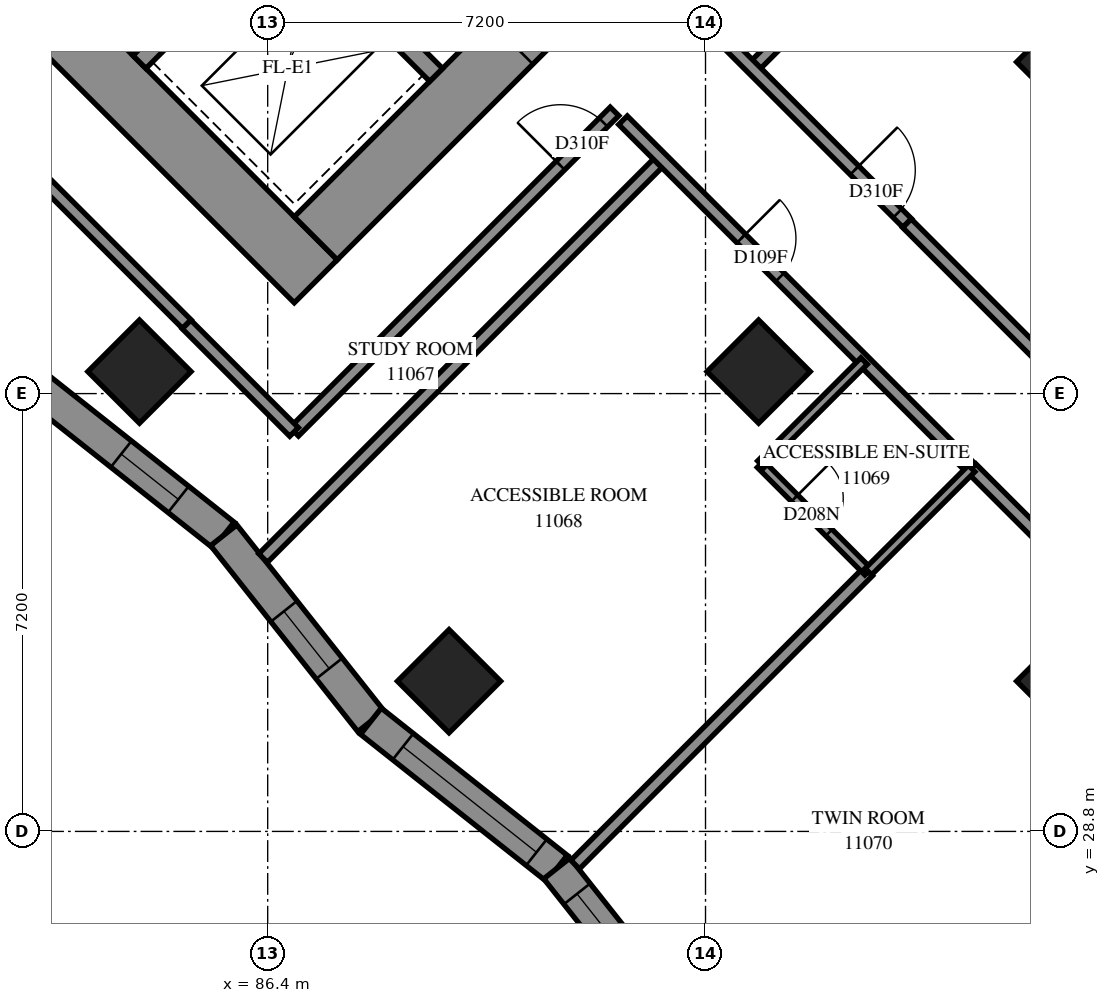
"""IFC4 building model, lengths in metres.
Left out: names, types, materials, properties, quantities, classifications, styles, units other than length and angle.
Written with IfcOpenShell. Run it as: python <this file> out.ifc"""

import sys

from ifc_helpers import new_model, si_unit, direction, frame, frame_2d, origin, origin_2d, place, context, subcontext, project, spatial, polyline, rectangle, outline, extrude, element, fill, save


model = new_model("IFC4")
c1 = context("Model", 3, precision=1e-05, world=origin(), true_north=direction((0.0, 1.0)))
c2 = subcontext(c1, "Body", "Model", "MODEL_VIEW")
j1 = project(units=[si_unit("LENGTHUNIT", "METRE"), si_unit("PLANEANGLEUNIT", "RADIAN")], contexts=[c1])
p1 = place(None, origin())
s1 = spatial("IfcSite", under=j1, at=p1, CompositionType="ELEMENT")
p2 = place(p1, origin())
s2 = spatial("IfcBuilding", under=s1, at=p2, CompositionType="ELEMENT")
p3 = place(p2, frame((0.0, 0.0, 44.0)))
s3 = spatial("IfcBuildingStorey", under=s2, at=p3, CompositionType="ELEMENT", Elevation=44.0)
for number, where, z_axis, x_axis in (
    (1, (84.291, 36.362, 0.0), (0.0, 0.0, 1.0), (0.707, -0.707, 0.0)),
    (2, (99.565, 41.453, 0.0), (0.0, 0.0, 1.0), (0.707, -0.707, 0.0)),
    (3, (94.474, 36.362, 0.0), (0.0, 0.0, 1.0), (0.707, -0.707, 0.0)),
    (4, (89.382, 31.271, 0.0), (0.0, 0.0, 1.0), (0.707, -0.707, 0.0)),
    (5, (99.565, 31.271, 0.0), (0.0, 0.0, 1.0), (0.707, -0.707, 0.0)),
):
    element("IfcColumn", number, at=place(p3, frame(where, z_axis=z_axis, x_axis=x_axis)), inside=s3, PredefinedType="COLUMN", context=c2, shape_type="SweptSolid", body=[
        extrude(rectangle(XDim=1.2, YDim=1.2, at=origin_2d()), origin(), (0.0, 0.0, 1.0), 3.1),
    ])
p4 = place(p3, frame((75.594, 49.443, -0.3), z_axis=(0.0, 0.0, 1.0), x_axis=(0.7071037324, -0.70710983, 0.0)))
e6 = element("IfcWall", 6, at=p4, inside=s3, PredefinedType="SHEAR", context=c2, shape_type="SweptSolid", body=[
    extrude(rectangle(XDim=16.4, YDim=1.0, at=frame_2d((8.2, 0.0))), origin(), (0.0, 0.0, 1.0), 2.7),
])
p5 = place(p3, frame((87.19, 38.554, -0.3), z_axis=(0.0, 0.0, 1.0), x_axis=(0.707103309, 0.7071102534, 0.0)))
e7 = element("IfcWall", 7, at=p5, inside=s3, PredefinedType="SHEAR", context=c2, shape_type="SweptSolid", body=[
    extrude(rectangle(XDim=14.4, YDim=1.0, at=frame_2d((7.2, 0.0))), origin(), (0.0, 0.0, 1.0), 2.7),
])
p6 = place(p5, frame((4.55, 0.0, 0.3)))
e8 = element("IfcOpeningElement", 8, at=p6, cuts=e7, PredefinedType="OPENING", context=c2, shape_type="SweptSolid", body=[
    extrude(rectangle(XDim=1.1, YDim=2.1, at=frame_2d((0.55, 1.05))), frame((0.0, 0.51, 0.0), z_axis=(0.0, -1.0, 0.0), x_axis=(1.0, 0.0, 0.0)), (0.0, 0.0, 1.0), 1.02),
])
p7 = place(p5, frame((11.35, 0.0, 0.3)))
e9 = element("IfcOpeningElement", 9, at=p7, cuts=e7, PredefinedType="OPENING", context=c2, shape_type="SweptSolid", body=[
    extrude(rectangle(XDim=1.1, YDim=2.1, at=frame_2d((0.55, 1.05))), frame((0.0, 0.51, 0.0), z_axis=(0.0, -1.0, 0.0), x_axis=(1.0, 0.0, 0.0)), (0.0, 0.0, 1.0), 1.02),
])
p8 = place(p3, frame((84.291, 41.453, 0.0), z_axis=(0.0, 0.0, 1.0), x_axis=(0.7071067812, 0.7071067812, 0.0)))
e10 = element("IfcWall", 10, at=p8, inside=s3, PredefinedType="SOLIDWALL", context=c2, shape_type="SweptSolid", body=[
    extrude(rectangle(XDim=3.3, YDim=0.3, at=frame_2d((1.65, 0.0))), origin(), (0.0, 0.0, 1.0), 3.1),
])
p9 = place(p3, frame((78.988, 51.423, 0.0), z_axis=(0.0, 0.0, 1.0), x_axis=(0.7071067812, -0.7071067812, 0.0)))
e11 = element("IfcWall", 11, at=p9, inside=s3, PredefinedType="SOLIDWALL", context=c2, shape_type="SweptSolid", body=[
    extrude(rectangle(XDim=14.4, YDim=0.3, at=frame_2d((7.2, 0.0))), origin(), (0.0, 0.0, 1.0), 3.1),
])
p10 = place(p9, frame((1.25, 0.0, 0.0)))
e12 = element("IfcOpeningElement", 12, at=p10, cuts=e11, PredefinedType="OPENING", context=c2, shape_type="SweptSolid", body=[
    extrude(rectangle(XDim=1.1, YDim=2.1, at=frame_2d((0.55, 1.05))), frame((0.0, 0.16, 0.0), z_axis=(0.0, -1.0, 0.0), x_axis=(1.0, 0.0, 0.0)), (0.0, 0.0, 1.0), 0.32),
])
p11 = place(p9, frame((4.85, 0.0, 0.0)))
e13 = element("IfcOpeningElement", 13, at=p11, cuts=e11, PredefinedType="OPENING", context=c2, shape_type="SweptSolid", body=[
    extrude(rectangle(XDim=1.1, YDim=2.1, at=frame_2d((0.55, 1.05))), frame((0.0, 0.16, 0.0), z_axis=(0.0, -1.0, 0.0), x_axis=(1.0, 0.0, 0.0)), (0.0, 0.0, 1.0), 0.32),
])
p12 = place(p9, frame((8.45, 0.0, 0.0)))
e14 = element("IfcOpeningElement", 14, at=p12, cuts=e11, PredefinedType="OPENING", context=c2, shape_type="SweptSolid", body=[
    extrude(rectangle(XDim=1.1, YDim=2.1, at=frame_2d((0.55, 1.05))), frame((0.0, 0.16, 0.0), z_axis=(0.0, -1.0, 0.0), x_axis=(1.0, 0.0, 0.0)), (0.0, 0.0, 1.0), 0.32),
])
p13 = place(p9, frame((12.05, 0.0, 0.0)))
e15 = element("IfcOpeningElement", 15, at=p13, cuts=e11, PredefinedType="OPENING", context=c2, shape_type="SweptSolid", body=[
    extrude(rectangle(XDim=1.1, YDim=2.1, at=frame_2d((0.55, 1.05))), frame((0.0, 0.16, 0.0), z_axis=(0.0, -1.0, 0.0), x_axis=(1.0, 0.0, 0.0)), (0.0, 0.0, 1.0), 0.32),
])
p14 = place(p3, frame((82.619, 36.091, 0.0), z_axis=(0.0, 0.0, 1.0), x_axis=(0.7841326465, -0.6205932587, 0.0)))
e16 = element("IfcWall", 16, at=p14, inside=s3, PredefinedType="SOLIDWALL", context=c2, shape_type="SweptSolid", body=[
    extrude(outline(polyline([(-0.032, -0.275), (3.868, -0.275), (3.932, 0.275), (0.032, 0.275), (-0.032, -0.275)])), origin(), (0.0, 0.0, 1.0), 3.1),
])
p15 = place(p14, frame((1.749, 0.0, 0.5)))
e17 = element("IfcOpeningElement", 17, at=p15, cuts=e16, PredefinedType="OPENING", context=c2, shape_type="SweptSolid", body=[
    extrude(rectangle(XDim=1.2, YDim=2.45, at=frame_2d((0.6, 1.225))), frame((0.0, 0.285, 0.0), z_axis=(0.0, -1.0, 0.0), x_axis=(1.0, 0.0, 0.0)), (0.0, 0.0, 1.0), 0.57),
])
p16 = place(p3, frame((85.677, 33.67, 0.0), z_axis=(0.0, 0.0, 1.0), x_axis=(0.6205932587, -0.7841326465, 0.0)))
e18 = element("IfcWall", 18, at=p16, inside=s3, PredefinedType="SOLIDWALL", context=c2, shape_type="SweptSolid", body=[
    extrude(outline(polyline([(0.032, -0.275), (3.932, -0.275), (3.868, 0.275), (-0.032, 0.275), (0.032, -0.275)])), origin(), (0.0, 0.0, 1.0), 3.1),
])
p17 = place(p16, frame((1.595, 0.0, 0.5)))
e19 = element("IfcOpeningElement", 19, at=p17, cuts=e18, PredefinedType="OPENING", context=c2, shape_type="SweptSolid", body=[
    extrude(rectangle(XDim=1.2, YDim=2.45, at=frame_2d((0.6, 1.225))), frame((0.0, 0.285, 0.0), z_axis=(0.0, -1.0, 0.0), x_axis=(1.0, 0.0, 0.0)), (0.0, 0.0, 1.0), 0.57),
])
p18 = place(p3, frame((88.097, 30.612, 0.0), z_axis=(0.0, 0.0, 1.0), x_axis=(0.7841326465, -0.6205932587, 0.0)))
e20 = element("IfcWall", 20, at=p18, inside=s3, PredefinedType="SOLIDWALL", context=c2, shape_type="SweptSolid", body=[
    extrude(outline(polyline([(-0.032, -0.275), (3.868, -0.275), (3.932, 0.275), (0.032, 0.275), (-0.032, -0.275)])), origin(), (0.0, 0.0, 1.0), 3.1),
])
p19 = place(p18, frame((0.673, 0.0, 0.5)))
e21 = element("IfcOpeningElement", 21, at=p19, cuts=e20, PredefinedType="OPENING", context=c2, shape_type="SweptSolid", body=[
    extrude(rectangle(XDim=2.8, YDim=2.45, at=frame_2d((1.4, 1.225))), frame((0.0, 0.285, 0.0), z_axis=(0.0, -1.0, 0.0), x_axis=(1.0, 0.0, 0.0)), (0.0, 0.0, 1.0), 0.57),
])
p20 = place(p3, frame((91.156, 28.192, 0.0), z_axis=(0.0, 0.0, 1.0), x_axis=(0.6205932587, -0.7841326465, 0.0)))
e22 = element("IfcWall", 22, at=p20, inside=s3, PredefinedType="SOLIDWALL", context=c2, shape_type="SweptSolid", body=[
    extrude(outline(polyline([(0.032, -0.275), (3.932, -0.275), (3.868, 0.275), (-0.032, 0.275), (0.032, -0.275)])), origin(), (0.0, 0.0, 1.0), 3.1),
])
p21 = place(p20, frame((0.534, 0.0, 0.5)))
e23 = element("IfcOpeningElement", 23, at=p21, cuts=e22, PredefinedType="OPENING", context=c2, shape_type="SweptSolid", body=[
    extrude(rectangle(XDim=2.8, YDim=2.45, at=frame_2d((1.4, 1.225))), frame((0.0, 0.285, 0.0), z_axis=(0.0, -1.0, 0.0), x_axis=(1.0, 0.0, 0.0)), (0.0, 0.0, 1.0), 0.57),
])
p22 = place(p3, frame((94.367, 41.349, 0.0), z_axis=(0.0, 0.0, 1.0), x_axis=(0.7071109781, 0.7071025843, 0.0)))
e24 = element("IfcWall", 24, at=p22, inside=s3, PredefinedType="PARTITIONING", context=c2, shape_type="SweptSolid", body=[
    extrude(rectangle(XDim=11.914, YDim=0.2, at=frame_2d((5.957, 0.0))), origin(), (0.0, 0.0, 1.0), 3.1),
])
p23 = place(p3, frame((86.324, 33.296, 0.0), z_axis=(0.0, 0.0, 1.0), x_axis=(0.7069990152, 0.7072145308, 0.0)))
e25 = element("IfcWall", 25, at=p23, inside=s3, PredefinedType="PARTITIONING", context=c2, shape_type="SweptSolid", body=[
    extrude(rectangle(XDim=9.28, YDim=0.2, at=frame_2d((4.64, 0.0))), origin(), (0.0, 0.0, 1.0), 3.1),
])
p24 = place(p3, frame((92.243, 40.495, 0.0), z_axis=(0.0, 0.0, 1.0), x_axis=(0.7071067812, -0.7071067812, 0.0)))
e26 = element("IfcWall", 26, at=p24, inside=s3, PredefinedType="PARTITIONING", context=c2, shape_type="SweptSolid", body=[
    extrude(rectangle(XDim=8.101, YDim=0.2, at=frame_2d((4.05, 0.0))), origin(), (0.0, 0.0, 1.0), 3.1),
])
p25 = place(p24, frame((2.75, 0.0, 0.0)))
e27 = element("IfcOpeningElement", 27, at=p25, cuts=e26, PredefinedType="OPENING", context=c2, shape_type="SweptSolid", body=[
    extrude(rectangle(XDim=0.9, YDim=2.1, at=frame_2d((0.45, 1.05))), frame((0.0, 0.11, 0.0), z_axis=(0.0, -1.0, 0.0), x_axis=(1.0, 0.0, 0.0)), (0.0, 0.0, 1.0), 0.22),
])
p26 = place(p3, frame((86.836, 35.372, 0.0), z_axis=(0.0, 0.0, 1.0), x_axis=(0.7071067812, 0.7071067812, 0.0)))
e28 = element("IfcWall", 28, at=p26, inside=s3, PredefinedType="PARTITIONING", context=c2, shape_type="SweptSolid", body=[
    extrude(rectangle(XDim=7.45, YDim=0.2, at=frame_2d((3.725, 0.0))), origin(), (0.0, 0.0, 1.0), 3.1),
])
p27 = place(p26, frame((6.192, 0.0, 0.0)))
e29 = element("IfcOpeningElement", 29, at=p27, cuts=e28, PredefinedType="OPENING", context=c2, shape_type="SweptSolid", body=[
    extrude(rectangle(XDim=1.0, YDim=2.1, at=frame_2d((0.5, 1.05))), frame((0.0, 0.11, 0.0), z_axis=(0.0, -1.0, 0.0), x_axis=(1.0, 0.0, 0.0)), (0.0, 0.0, 1.0), 0.22),
])
p28 = place(p3, frame((96.53, 23.146, 0.0), z_axis=(0.0, 0.0, 1.0), x_axis=(0.7071140909, 0.7070994714, 0.0)))
e30 = element("IfcWall", 30, at=p28, inside=s3, PredefinedType="PARTITIONING", context=c2, shape_type="SweptSolid", body=[
    extrude(rectangle(XDim=6.84, YDim=0.2, at=frame_2d((3.42, 0.0))), origin(), (0.0, 0.0, 1.0), 3.1),
])
p29 = place(p3, frame((91.456, 28.255, 0.0), z_axis=(0.0, 0.0, 1.0), x_axis=(0.7071067812, 0.7071067812, 0.0)))
e31 = element("IfcWall", 31, at=p29, inside=s3, PredefinedType="PARTITIONING", context=c2, shape_type="SweptSolid", body=[
    extrude(rectangle(XDim=6.816, YDim=0.2, at=frame_2d((3.408, 0.0))), origin(), (0.0, 0.0, 1.0), 3.1),
])
p30 = place(p3, frame((85.07, 37.142, 0.0), z_axis=(0.0, 0.0, 1.0), x_axis=(-0.7070899851, 0.7071235769, 0.0)))
e32 = element("IfcWall", 32, at=p30, inside=s3, PredefinedType="PARTITIONING", context=c2, shape_type="SweptSolid", body=[
    extrude(rectangle(XDim=5.954, YDim=0.2, at=frame_2d((2.977, 0.0))), origin(), (0.0, 0.0, 1.0), 3.1),
])
p31 = place(p3, frame((93.735, 41.987, 0.0), z_axis=(0.0, 0.0, 1.0), x_axis=(0.7071067812, -0.7071067812, 0.0)))
e33 = element("IfcWall", 33, at=p31, inside=s3, PredefinedType="PARTITIONING", context=c2, shape_type="SweptSolid", body=[
    extrude(rectangle(XDim=4.5, YDim=0.2, at=frame_2d((2.25, 0.0))), origin(), (0.0, 0.0, 1.0), 3.1),
])
p32 = place(p31, frame((3.274, 0.0, 0.0)))
e34 = element("IfcOpeningElement", 34, at=p32, cuts=e33, PredefinedType="OPENING", context=c2, shape_type="SweptSolid", body=[
    extrude(rectangle(XDim=1.0, YDim=2.1, at=frame_2d((0.5, 1.05))), frame((0.0, 0.11, 0.0), z_axis=(0.0, -1.0, 0.0), x_axis=(1.0, 0.0, 0.0)), (0.0, 0.0, 1.0), 0.22),
])
p33 = place(p3, frame((96.913, 38.801, 0.0), z_axis=(0.0, 0.0, 1.0), x_axis=(0.7068288851, -0.7073845681, 0.0)))
e35 = element("IfcWall", 35, at=p33, inside=s3, PredefinedType="PARTITIONING", context=c2, shape_type="SweptSolid", body=[
    extrude(rectangle(XDim=3.599, YDim=0.2, at=frame_2d((1.8, 0.0))), origin(), (0.0, 0.0, 1.0), 3.1),
])
p34 = place(p3, frame((97.976, 34.772, 0.0), z_axis=(0.0, 0.0, 1.0), x_axis=(0.7073845681, -0.7068288851, 0.0)))
e36 = element("IfcWall", 36, at=p34, inside=s3, PredefinedType="PARTITIONING", context=c2, shape_type="SweptSolid", body=[
    extrude(rectangle(XDim=3.599, YDim=0.2, at=frame_2d((1.8, 0.0))), origin(), (0.0, 0.0, 1.0), 3.1),
])
p35 = place(p34, frame((1.858, 0.0, 0.0)))
e37 = element("IfcOpeningElement", 37, at=p35, cuts=e36, PredefinedType="OPENING", context=c2, shape_type="SweptSolid", body=[
    extrude(rectangle(XDim=0.9, YDim=2.1, at=frame_2d((0.45, 1.05))), frame((0.0, 0.11, 0.0), z_axis=(0.0, -1.0, 0.0), x_axis=(1.0, 0.0, 0.0)), (0.0, 0.0, 1.0), 0.22),
])
p36 = place(p3, frame((85.065, 37.137, 0.0), z_axis=(0.0, 0.0, 1.0), x_axis=(0.7071067812, -0.7071067812, 0.0)))
e38 = element("IfcWall", 38, at=p36, inside=s3, PredefinedType="PARTITIONING", context=c2, shape_type="SweptSolid", body=[
    extrude(rectangle(XDim=2.5, YDim=0.2, at=frame_2d((1.25, 0.0))), origin(), (0.0, 0.0, 1.0), 3.1),
])
p37 = place(p3, frame((94.505, 34.839, 0.0), z_axis=(0.0, 0.0, 1.0), x_axis=(0.7071067812, -0.7071067812, 0.0)))
e39 = element("IfcWall", 39, at=p37, inside=s3, PredefinedType="PARTITIONING", context=c2, shape_type="SweptSolid", body=[
    extrude(rectangle(XDim=2.5, YDim=0.15, at=frame_2d((1.25, 0.0))), origin(), (0.0, 0.0, 1.0), 3.1),
])
p38 = place(p37, frame((0.792, 0.0, 0.0)))
e40 = element("IfcOpeningElement", 40, at=p38, cuts=e39, PredefinedType="OPENING", context=c2, shape_type="SweptSolid", body=[
    extrude(rectangle(XDim=0.8, YDim=2.1, at=frame_2d((0.4, 1.05))), frame((0.0, 0.085, 0.0), z_axis=(0.0, -1.0, 0.0), x_axis=(1.0, 0.0, 0.0)), (0.0, 0.0, 1.0), 0.17),
])
for number, where, z_axis, x_axis in (
    (41, (96.278, 33.072, 0.0), (0.0, 0.0, 1.0), (0.708, 0.707, 0.0)),
    (42, (94.511, 34.839, 0.0), (0.0, 0.0, 1.0), (0.708, 0.707, 0.0)),
):
    element("IfcWall", number, at=place(p3, frame(where, z_axis=z_axis, x_axis=x_axis)), inside=s3, PredefinedType="PARTITIONING", context=c2, shape_type="SweptSolid", body=[
        extrude(rectangle(XDim=2.4, YDim=0.15, at=frame_2d((1.2, 0.0))), origin(), (0.0, 0.0, 1.0), 3.1),
    ])
p39 = place(p15, origin())
e43 = element("IfcWindow", 43, at=p39, inside=s3, PartitioningType="SINGLE_PANEL", PredefinedType="WINDOW", context=c2, shape_type="SweptSolid", body=[
    extrude(rectangle(XDim=1.2, YDim=2.45, at=frame_2d((0.6, 1.225))), frame((0.0, 0.155, 0.0), z_axis=(0.0, -1.0, 0.0), x_axis=(1.0, 0.0, 0.0)), (0.0, 0.0, 1.0), 0.06),
])
fill(e17, e43)
p40 = place(p17, origin())
e44 = element("IfcWindow", 44, at=p40, inside=s3, PartitioningType="SINGLE_PANEL", PredefinedType="WINDOW", context=c2, shape_type="SweptSolid", body=[
    extrude(rectangle(XDim=1.2, YDim=2.45, at=frame_2d((0.6, 1.225))), frame((0.0, 0.155, 0.0), z_axis=(0.0, -1.0, 0.0), x_axis=(1.0, 0.0, 0.0)), (0.0, 0.0, 1.0), 0.06),
])
fill(e19, e44)
p41 = place(p19, origin())
e45 = element("IfcWindow", 45, at=p41, inside=s3, PartitioningType="SINGLE_PANEL", PredefinedType="WINDOW", context=c2, shape_type="SweptSolid", body=[
    extrude(rectangle(XDim=2.8, YDim=2.45, at=frame_2d((1.4, 1.225))), frame((0.0, 0.155, 0.0), z_axis=(0.0, -1.0, 0.0), x_axis=(1.0, 0.0, 0.0)), (0.0, 0.0, 1.0), 0.06),
])
fill(e21, e45)
p42 = place(p21, origin())
e46 = element("IfcWindow", 46, at=p42, inside=s3, PartitioningType="SINGLE_PANEL", PredefinedType="WINDOW", context=c2, shape_type="SweptSolid", body=[
    extrude(rectangle(XDim=2.8, YDim=2.45, at=frame_2d((1.4, 1.225))), frame((0.0, 0.155, 0.0), z_axis=(0.0, -1.0, 0.0), x_axis=(1.0, 0.0, 0.0)), (0.0, 0.0, 1.0), 0.06),
])
fill(e23, e46)
p43 = place(p32, origin())
e47 = element("IfcDoor", 47, at=p43, inside=s3, OperationType="SINGLE_SWING_RIGHT", PredefinedType="DOOR", context=c2, shape_type="SweptSolid", body=[
    extrude(rectangle(XDim=1.0, YDim=2.1, at=frame_2d((0.5, 1.05))), frame((0.0, 0.025, 0.0), z_axis=(0.0, -1.0, 0.0), x_axis=(1.0, 0.0, 0.0)), (0.0, 0.0, 1.0), 0.05),
])
fill(e34, e47)
p44 = place(p27, origin())
e48 = element("IfcDoor", 48, at=p44, inside=s3, OperationType="SINGLE_SWING_RIGHT", PredefinedType="DOOR", context=c2, shape_type="SweptSolid", body=[
    extrude(rectangle(XDim=1.0, YDim=2.1, at=frame_2d((0.5, 1.05))), frame((0.0, 0.025, 0.0), z_axis=(0.0, -1.0, 0.0), x_axis=(1.0, 0.0, 0.0)), (0.0, 0.0, 1.0), 0.05),
])
fill(e29, e48)
p45 = place(p25, origin())
e49 = element("IfcDoor", 49, at=p45, inside=s3, OperationType="SINGLE_SWING_LEFT", PredefinedType="DOOR", context=c2, shape_type="SweptSolid", body=[
    extrude(rectangle(XDim=0.9, YDim=2.1, at=frame_2d((0.45, 1.05))), frame((0.0, 0.025, 0.0), z_axis=(0.0, -1.0, 0.0), x_axis=(1.0, 0.0, 0.0)), (0.0, 0.0, 1.0), 0.05),
])
fill(e27, e49)
p46 = place(p38, origin())
e50 = element("IfcDoor", 50, at=p46, inside=s3, OperationType="SINGLE_SWING_RIGHT", PredefinedType="DOOR", context=c2, shape_type="SweptSolid", body=[
    extrude(rectangle(XDim=0.8, YDim=2.1, at=frame_2d((0.4, 1.05))), frame((0.0, 0.025, 0.0), z_axis=(0.0, -1.0, 0.0), x_axis=(1.0, 0.0, 0.0)), (0.0, 0.0, 1.0), 0.05),
])
fill(e40, e50)
save(model, sys.argv[1])
